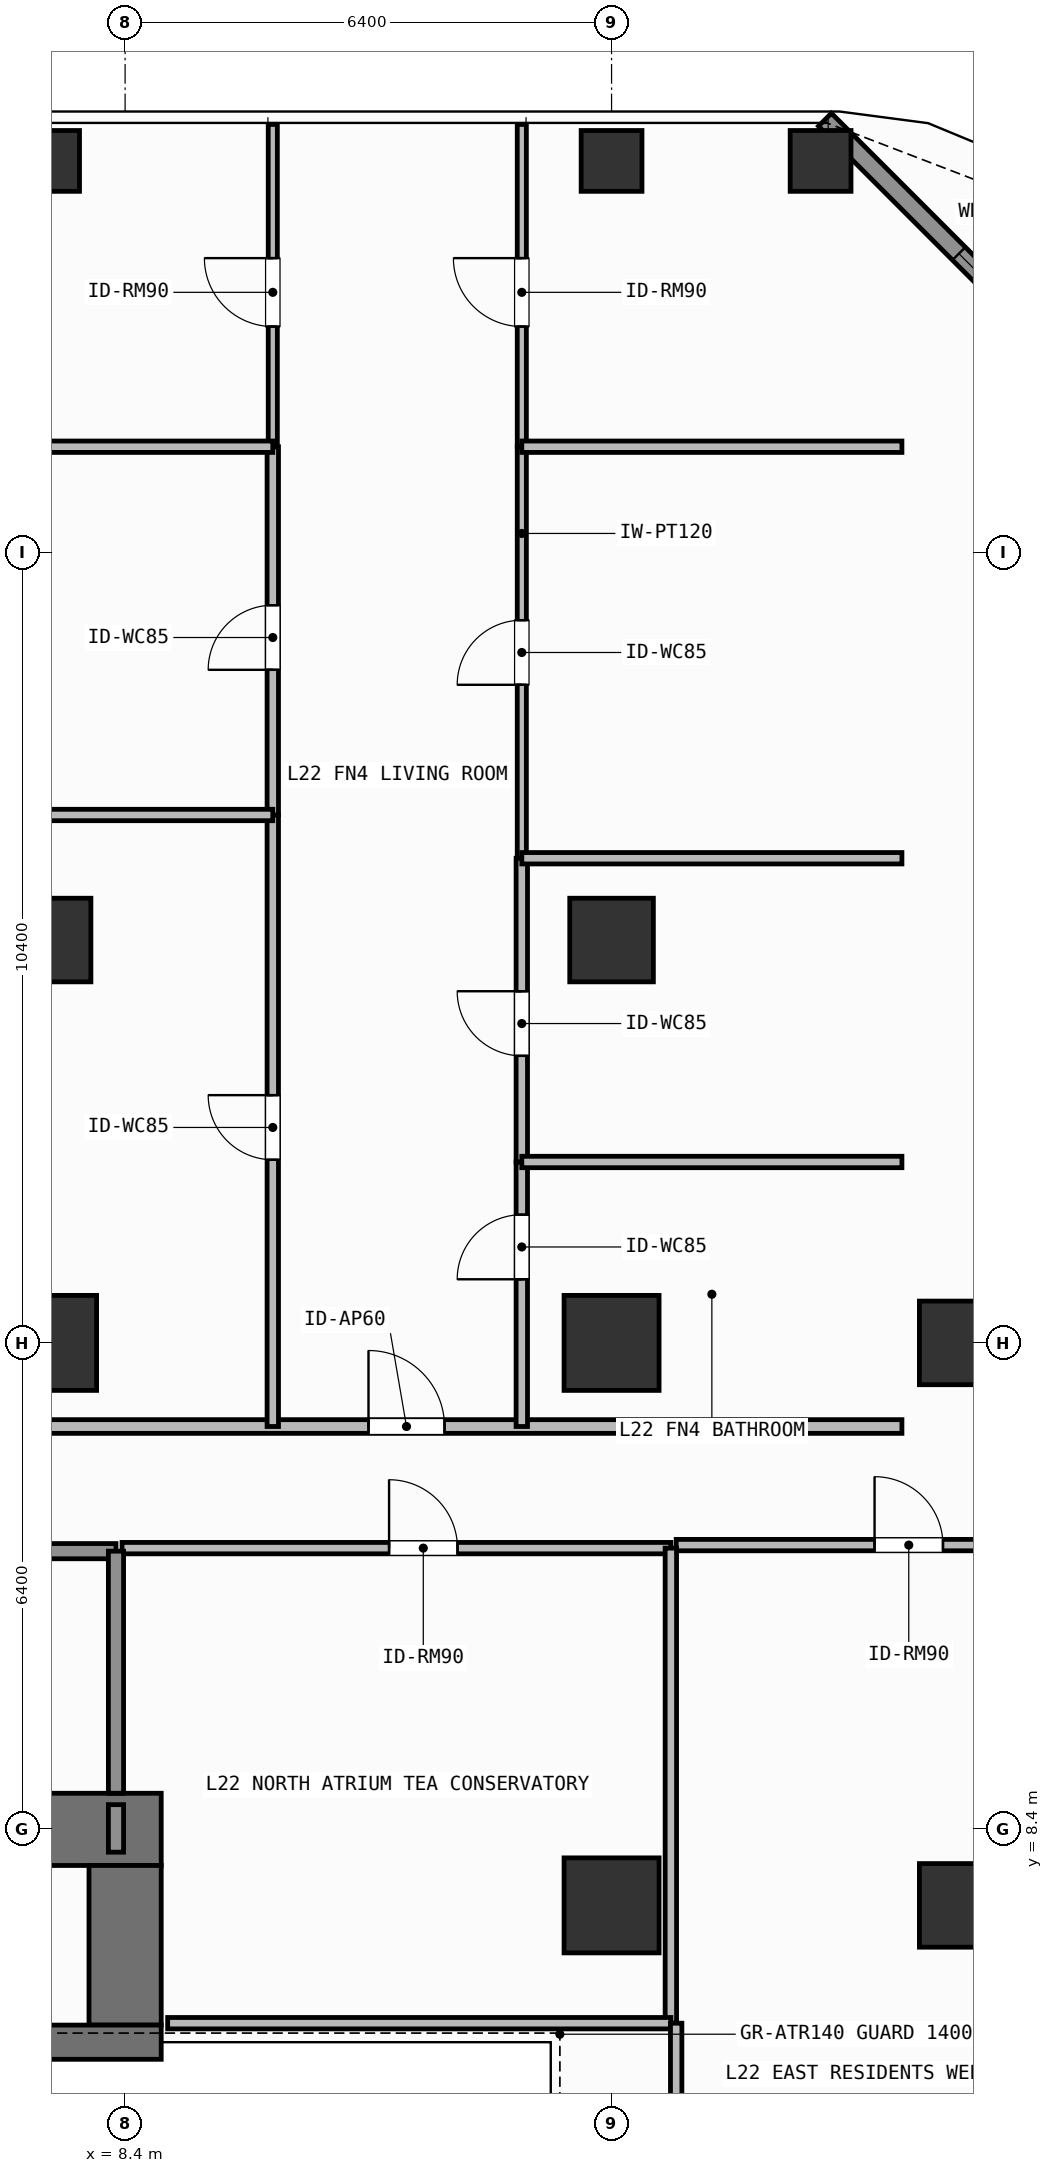
"""IFC4 building model, lengths in metres.
Left out: names, types, materials, properties, quantities, classifications, styles, units other than length and angle.
Written with IfcOpenShell. Run it as: python <this file> out.ifc"""

import sys

from ifc_helpers import new_model, si_unit, direction, frame, frame_2d, origin, origin_2d, place, context, subcontext, project, spatial, rectangle, hollow_rectangle, extrude, element, fill, save


model = new_model("IFC4")
c1 = context("Model", 3, precision=1e-05, world=origin(), true_north=direction((0.0, 1.0)))
c2 = subcontext(c1, "Body", "Model", "MODEL_VIEW")
j1 = project(units=[si_unit("LENGTHUNIT", "METRE"), si_unit("PLANEANGLEUNIT", "RADIAN")], contexts=[c1])
p1 = place(None, origin())
s1 = spatial("IfcSite", under=j1, at=p1, CompositionType="ELEMENT")
p2 = place(p1, origin())
s2 = spatial("IfcBuilding", under=s1, at=p2, CompositionType="ELEMENT")
p3 = place(p2, frame((0.0, 0.0, 89.1)))
s3 = spatial("IfcBuildingStorey", under=s2, at=p3, CompositionType="ELEMENT", Elevation=89.1)
p4 = place(p3, frame((-7.55, 8.4, 0.0), z_axis=(0.0, 0.0, 1.0), x_axis=(1.0, 0.0, 0.0)))
e1 = element("IfcWall", 1, at=p4, inside=s3, PredefinedType="SHEAR", context=c2, shape_type="SweptSolid", body=[
    extrude(rectangle(XDim=16.425, YDim=0.95, at=frame_2d((8.212, 0.0))), origin(), (0.0, 0.0, 1.0), 3.9),
])
p5 = place(p3, frame((8.4, 5.825, 0.0), z_axis=(0.0, 0.0, 1.0), x_axis=(0.0, 1.0, 0.0)))
e2 = element("IfcWall", 2, at=p5, inside=s3, PredefinedType="SHEAR", context=c2, shape_type="SweptSolid", body=[
    extrude(rectangle(XDim=2.1, YDim=0.95, at=frame_2d((1.05, 0.0))), origin(), (0.0, 0.0, 1.0), 3.9),
])
p6 = place(p3, frame((3.045, 5.6, 0.0), z_axis=(0.0, 0.0, 1.0), x_axis=(1.0, 0.0, 0.0)))
e3 = element("IfcWall", 3, at=p6, inside=s3, PredefinedType="SHEAR", context=c2, shape_type="SweptSolid", body=[
    extrude(rectangle(XDim=5.83, YDim=0.45, at=frame_2d((2.915, 0.0))), origin(), (0.0, 0.0, 1.0), 3.9),
])
for number, where, z_axis, x_axis in (
    (4, (7.4, 14.8, 0.0), (0.0, 0.0, 1.0), (1.0, 0.0, 0.0)),
    (5, (14.8, 14.8, 0.0), (0.0, 0.0, 1.0), (1.0, 0.0, 0.0)),
    (6, (14.8, 7.4, 0.0), (0.0, 0.0, 1.0), (1.0, 0.0, 0.0)),
):
    element("IfcColumn", number, at=place(p3, frame(where, z_axis=z_axis, x_axis=x_axis)), inside=s3, PredefinedType="COLUMN", context=c2, shape_type="SweptSolid", body=[
        extrude(rectangle(XDim=1.25, YDim=1.25, at=origin_2d()), origin(), (0.0, 0.0, 1.0), 3.9),
    ])
for number, where, z_axis, x_axis in (
    (7, (19.4, 7.4, 0.0), (0.0, 0.0, 1.0), (1.0, 0.0, 0.0)),
    (8, (19.4, 14.8, 0.0), (0.0, 0.0, 1.0), (1.0, 0.0, 0.0)),
    (9, (7.4, 20.1, 0.0), (0.0, 0.0, 1.0), (1.0, 0.0, 0.0)),
    (10, (14.8, 20.1, 0.0), (0.0, 0.0, 1.0), (1.0, 0.0, 0.0)),
):
    element("IfcColumn", number, at=place(p3, frame(where, z_axis=z_axis, x_axis=x_axis)), inside=s3, PredefinedType="COLUMN", context=c2, shape_type="SweptSolid", body=[
        extrude(rectangle(XDim=1.1, YDim=1.1, at=origin_2d()), origin(), (0.0, 0.0, 1.0), 3.9),
    ])
for number, where, z_axis, x_axis in (
    (11, (17.55, 30.35, 0.0), (0.0, 0.0, 1.0), (1.0, 0.0, 0.0)),
    (12, (7.4, 30.35, 0.0), (0.0, 0.0, 1.0), (1.0, 0.0, 0.0)),
    (13, (14.8, 30.35, 0.0), (0.0, 0.0, 1.0), (1.0, 0.0, 0.0)),
):
    element("IfcColumn", number, at=place(p3, frame(where, z_axis=z_axis, x_axis=x_axis)), inside=s3, PredefinedType="COLUMN", context=c2, shape_type="SweptSolid", body=[
        extrude(hollow_rectangle(XDim=0.8, YDim=0.8, WallThickness=0.036, at=origin_2d()), origin(), (0.0, 0.0, 1.0), 3.9),
    ])
p7 = place(p3, frame((17.608, 30.892, 0.0), z_axis=(0.0, 0.0, 1.0), x_axis=(0.707106781187, -0.707106781187, 0.0)))
e14 = element("IfcWall", 14, at=p7, inside=s3, PredefinedType="SOLIDWALL", context=c2, shape_type="SweptSolid", body=[
    extrude(rectangle(XDim=6.484, YDim=0.24, at=frame_2d((3.242, 0.0))), origin(), (0.0, 0.0, 1.0), 3.68),
])
p8 = place(p7, frame((2.492, 0.0, 0.8)))
e15 = element("IfcOpeningElement", 15, at=p8, cuts=e14, PredefinedType="OPENING", context=c2, shape_type="SweptSolid", body=[
    extrude(rectangle(XDim=1.5, YDim=1.85, at=frame_2d((0.75, 0.925))), frame((0.0, 0.13, 0.0), z_axis=(0.0, -1.0, 0.0), x_axis=(1.0, 0.0, 0.0)), (0.0, 0.0, 1.0), 0.26),
])
p9 = place(p3, frame((4.58, 12.06, 0.0), z_axis=(0.0, 0.0, 1.0), x_axis=(1.0, 0.0, 0.0)))
e16 = element("IfcWall", 16, at=p9, inside=s3, PredefinedType="SOLIDWALL", context=c2, shape_type="SweptSolid", body=[
    extrude(rectangle(XDim=3.7, YDim=0.2, at=frame_2d((1.85, 0.0))), origin(), (0.0, 0.0, 1.0), 3.68),
])
p10 = place(p9, frame((1.212, 0.0, 0.0)))
e17 = element("IfcOpeningElement", 17, at=p10, cuts=e16, PredefinedType="OPENING", context=c2, shape_type="SweptSolid", body=[
    extrude(rectangle(XDim=1.1, YDim=2.15, at=frame_2d((0.55, 1.075))), frame((0.0, 0.11, 0.0), z_axis=(0.0, -1.0, 0.0), x_axis=(1.0, 0.0, 0.0)), (0.0, 0.0, 1.0), 0.22),
])
p11 = place(p3, frame((8.36, 12.1, 0.0), z_axis=(0.0, 0.0, 1.0), x_axis=(1.0, 0.0, 0.0)))
e18 = element("IfcWall", 18, at=p11, inside=s3, PredefinedType="PARTITIONING", context=c2, shape_type="SweptSolid", body=[
    extrude(rectangle(XDim=7.22, YDim=0.15, at=frame_2d((3.61, 0.0))), origin(), (0.0, 0.0, 1.0), 3.68),
])
p12 = place(p11, frame((3.513, 0.0, 0.0)))
e19 = element("IfcOpeningElement", 19, at=p12, cuts=e18, PredefinedType="OPENING", context=c2, shape_type="SweptSolid", body=[
    extrude(rectangle(XDim=0.9, YDim=2.1, at=frame_2d((0.45, 1.05))), frame((0.0, 0.085, 0.0), z_axis=(0.0, -1.0, 0.0), x_axis=(1.0, 0.0, 0.0)), (0.0, 0.0, 1.0), 0.17),
])
p13 = place(p3, frame((6.117, 13.7, 0.0), z_axis=(0.0, 0.0, 1.0), x_axis=(1.0, 0.0, 0.0)))
e20 = element("IfcWall", 20, at=p13, inside=s3, PredefinedType="PARTITIONING", context=c2, shape_type="SweptSolid", body=[
    extrude(rectangle(XDim=12.503, YDim=0.18, at=frame_2d((6.251, 0.0))), origin(), (0.0, 0.0, 1.0), 3.68),
])
p14 = place(p13, frame((5.485, 0.0, 0.0)))
e21 = element("IfcOpeningElement", 21, at=p14, cuts=e20, PredefinedType="OPENING", context=c2, shape_type="SweptSolid", body=[
    extrude(rectangle(XDim=1.0, YDim=2.2, at=frame_2d((0.5, 1.1))), frame((0.0, 0.1, 0.0), z_axis=(0.0, -1.0, 0.0), x_axis=(1.0, 0.0, 0.0)), (0.0, 0.0, 1.0), 0.2),
])
p15 = place(p3, frame((10.343, 13.7, 0.0), z_axis=(0.0, 0.0, 1.0), x_axis=(0.0, 1.0, 0.0)))
e22 = element("IfcWall", 22, at=p15, inside=s3, PredefinedType="PARTITIONING", context=c2, shape_type="SweptSolid", body=[
    extrude(rectangle(XDim=8.045, YDim=0.15, at=frame_2d((4.022, 0.0))), origin(), (0.0, 0.0, 1.0), 3.68),
])
p16 = place(p15, frame((3.51, 0.0, 0.0)))
e23 = element("IfcOpeningElement", 23, at=p16, cuts=e22, PredefinedType="OPENING", context=c2, shape_type="SweptSolid", body=[
    extrude(rectangle(XDim=0.85, YDim=2.1, at=frame_2d((0.425, 1.05))), frame((0.0, 0.085, 0.0), z_axis=(0.0, -1.0, 0.0), x_axis=(1.0, 0.0, 0.0)), (0.0, 0.0, 1.0), 0.17),
])
p17 = place(p3, frame((10.343, 21.745, 0.0), z_axis=(0.0, 0.0, 1.0), x_axis=(0.0, 1.0, 0.0)))
e24 = element("IfcWall", 24, at=p17, inside=s3, PredefinedType="PARTITIONING", context=c2, shape_type="SweptSolid", body=[
    extrude(rectangle(XDim=4.845, YDim=0.15, at=frame_2d((2.422, 0.0))), origin(), (0.0, 0.0, 1.0), 3.68),
])
p18 = place(p17, frame((1.91, 0.0, 0.0)))
e25 = element("IfcOpeningElement", 25, at=p18, cuts=e24, PredefinedType="OPENING", context=c2, shape_type="SweptSolid", body=[
    extrude(rectangle(XDim=0.85, YDim=2.1, at=frame_2d((0.425, 1.05))), frame((0.0, 0.085, 0.0), z_axis=(0.0, -1.0, 0.0), x_axis=(1.0, 0.0, 0.0)), (0.0, 0.0, 1.0), 0.17),
])
p19 = place(p3, frame((10.343, 26.59, 0.0), z_axis=(0.0, 0.0, 1.0), x_axis=(0.0, 1.0, 0.0)))
e26 = element("IfcWall", 26, at=p19, inside=s3, PredefinedType="PARTITIONING", context=c2, shape_type="SweptSolid", body=[
    extrude(rectangle(XDim=4.24, YDim=0.12, at=frame_2d((2.12, 0.0))), origin(), (0.0, 0.0, 1.0), 3.68),
])
p20 = place(p19, frame((1.581, 0.0, 0.0)))
e27 = element("IfcOpeningElement", 27, at=p20, cuts=e26, PredefinedType="OPENING", context=c2, shape_type="SweptSolid", body=[
    extrude(rectangle(XDim=0.9, YDim=2.1, at=frame_2d((0.45, 1.05))), frame((0.0, 0.07, 0.0), z_axis=(0.0, -1.0, 0.0), x_axis=(1.0, 0.0, 0.0)), (0.0, 0.0, 1.0), 0.14),
])
p21 = place(p3, frame((13.619, 13.7, 0.0), z_axis=(0.0, 0.0, 1.0), x_axis=(0.0, 1.0, 0.0)))
e28 = element("IfcWall", 28, at=p21, inside=s3, PredefinedType="PARTITIONING", context=c2, shape_type="SweptSolid", body=[
    extrude(rectangle(XDim=3.48, YDim=0.15, at=frame_2d((1.74, 0.0))), origin(), (0.0, 0.0, 1.0), 3.68),
])
p22 = place(p21, frame((1.937, 0.0, 0.0)))
e29 = element("IfcOpeningElement", 29, at=p22, cuts=e28, PredefinedType="OPENING", context=c2, shape_type="SweptSolid", body=[
    extrude(rectangle(XDim=0.85, YDim=2.1, at=frame_2d((0.425, 1.05))), frame((0.0, 0.085, 0.0), z_axis=(0.0, -1.0, 0.0), x_axis=(1.0, 0.0, 0.0)), (0.0, 0.0, 1.0), 0.17),
])
p23 = place(p3, frame((13.619, 17.18, 0.0), z_axis=(0.0, 0.0, 1.0), x_axis=(0.0, 1.0, 0.0)))
e30 = element("IfcWall", 30, at=p23, inside=s3, PredefinedType="PARTITIONING", context=c2, shape_type="SweptSolid", body=[
    extrude(rectangle(XDim=3.996, YDim=0.15, at=frame_2d((1.998, 0.0))), origin(), (0.0, 0.0, 1.0), 3.68),
])
p24 = place(p23, frame((1.396, 0.0, 0.0)))
e31 = element("IfcOpeningElement", 31, at=p24, cuts=e30, PredefinedType="OPENING", context=c2, shape_type="SweptSolid", body=[
    extrude(rectangle(XDim=0.85, YDim=2.1, at=frame_2d((0.425, 1.05))), frame((0.0, 0.085, 0.0), z_axis=(0.0, -1.0, 0.0), x_axis=(1.0, 0.0, 0.0)), (0.0, 0.0, 1.0), 0.17),
])
p25 = place(p3, frame((13.619, 21.176, 0.0), z_axis=(0.0, 0.0, 1.0), x_axis=(0.0, 1.0, 0.0)))
e32 = element("IfcWall", 32, at=p25, inside=s3, PredefinedType="PARTITIONING", context=c2, shape_type="SweptSolid", body=[
    extrude(rectangle(XDim=5.414, YDim=0.12, at=frame_2d((2.707, 0.0))), origin(), (0.0, 0.0, 1.0), 3.68),
])
p26 = place(p25, frame((2.282, 0.0, 0.0)))
e33 = element("IfcOpeningElement", 33, at=p26, cuts=e32, PredefinedType="OPENING", context=c2, shape_type="SweptSolid", body=[
    extrude(rectangle(XDim=0.85, YDim=2.1, at=frame_2d((0.425, 1.05))), frame((0.0, 0.07, 0.0), z_axis=(0.0, -1.0, 0.0), x_axis=(1.0, 0.0, 0.0)), (0.0, 0.0, 1.0), 0.14),
])
p27 = place(p3, frame((13.619, 26.59, 0.0), z_axis=(0.0, 0.0, 1.0), x_axis=(0.0, 1.0, 0.0)))
e34 = element("IfcWall", 34, at=p27, inside=s3, PredefinedType="PARTITIONING", context=c2, shape_type="SweptSolid", body=[
    extrude(rectangle(XDim=4.24, YDim=0.12, at=frame_2d((2.12, 0.0))), origin(), (0.0, 0.0, 1.0), 3.68),
])
p28 = place(p27, frame((1.581, 0.0, 0.0)))
e35 = element("IfcOpeningElement", 35, at=p28, cuts=e34, PredefinedType="OPENING", context=c2, shape_type="SweptSolid", body=[
    extrude(rectangle(XDim=0.9, YDim=2.1, at=frame_2d((0.45, 1.05))), frame((0.0, 0.07, 0.0), z_axis=(0.0, -1.0, 0.0), x_axis=(1.0, 0.0, 0.0)), (0.0, 0.0, 1.0), 0.14),
])
p29 = place(p3, frame((15.65, 12.14, 0.0), z_axis=(0.0, 0.0, 1.0), x_axis=(1.0, 0.0, 0.0)))
e36 = element("IfcWall", 36, at=p29, inside=s3, PredefinedType="PARTITIONING", context=c2, shape_type="SweptSolid", body=[
    extrude(rectangle(XDim=6.47, YDim=0.15, at=frame_2d((3.235, 0.0))), origin(), (0.0, 0.0, 1.0), 3.68),
])
p30 = place(p29, frame((2.61, 0.0, 0.0)))
e37 = element("IfcOpeningElement", 37, at=p30, cuts=e36, PredefinedType="OPENING", context=c2, shape_type="SweptSolid", body=[
    extrude(rectangle(XDim=0.9, YDim=2.1, at=frame_2d((0.45, 1.05))), frame((0.0, 0.085, 0.0), z_axis=(0.0, -1.0, 0.0), x_axis=(1.0, 0.0, 0.0)), (0.0, 0.0, 1.0), 0.17),
])
p31 = place(p3, frame((8.28, 8.875, 0.0), z_axis=(0.0, 0.0, 1.0), x_axis=(0.0, 1.0, 0.0)))
e38 = element("IfcWall", 38, at=p31, inside=s3, PredefinedType="SOLIDWALL", context=c2, shape_type="SweptSolid", body=[
    extrude(rectangle(XDim=3.185, YDim=0.2, at=frame_2d((1.593, 0.0))), origin(), (0.0, 0.0, 1.0), 3.68),
])
p32 = place(p3, frame((8.28, 8.1, 0.0), z_axis=(0.0, 0.0, 1.0), x_axis=(0.0, 1.0, 0.0)))
e39 = element("IfcWall", 39, at=p32, inside=s3, PredefinedType="SOLIDWALL", context=c2, shape_type="SweptSolid", body=[
    extrude(rectangle(XDim=0.625, YDim=0.2, at=frame_2d((0.312, 0.0))), origin(), (0.0, 0.0, 1.0), 3.68),
])
p33 = place(p3, frame((15.58, 5.85, 0.0), z_axis=(0.0, 0.0, 1.0), x_axis=(0.0, 1.0, 0.0)))
e40 = element("IfcWall", 40, at=p33, inside=s3, PredefinedType="PARTITIONING", context=c2, shape_type="SweptSolid", body=[
    extrude(rectangle(XDim=6.25, YDim=0.15, at=frame_2d((3.125, 0.0))), origin(), (0.0, 0.0, 1.0), 3.68),
])
p34 = place(p3, frame((8.96, 5.85, 0.0), z_axis=(0.0, 0.0, 1.0), x_axis=(1.0, 0.0, 0.0)))
e41 = element("IfcWall", 41, at=p34, inside=s3, PredefinedType="PARTITIONING", context=c2, shape_type="SweptSolid", body=[
    extrude(rectangle(XDim=6.62, YDim=0.15, at=frame_2d((3.31, 0.0))), origin(), (0.0, 0.0, 1.0), 3.68),
])
for number, where, z_axis, x_axis in (
    (42, (6.117, 21.745, 0.0), (0.0, 0.0, 1.0), (1.0, 0.0, 0.0)),
    (43, (6.117, 26.59, 0.0), (0.0, 0.0, 1.0), (1.0, 0.0, 0.0)),
):
    element("IfcWall", number, at=place(p3, frame(where, z_axis=z_axis, x_axis=x_axis)), inside=s3, PredefinedType="PARTITIONING", context=c2, shape_type="SweptSolid", body=[
        extrude(rectangle(XDim=4.226, YDim=0.15, at=frame_2d((2.113, 0.0))), origin(), (0.0, 0.0, 1.0), 3.68),
    ])
for number, where, z_axis, x_axis in (
    (44, (13.619, 17.18, 0.0), (0.0, 0.0, 1.0), (1.0, 0.0, 0.0)),
    (45, (13.619, 21.176, 0.0), (0.0, 0.0, 1.0), (1.0, 0.0, 0.0)),
    (46, (13.619, 26.59, 0.0), (0.0, 0.0, 1.0), (1.0, 0.0, 0.0)),
):
    element("IfcWall", number, at=place(p3, frame(where, z_axis=z_axis, x_axis=x_axis)), inside=s3, PredefinedType="PARTITIONING", context=c2, shape_type="SweptSolid", body=[
        extrude(rectangle(XDim=5.001, YDim=0.15, at=frame_2d((2.5, 0.0))), origin(), (0.0, 0.0, 1.0), 3.68),
    ])
p35 = place(p3, frame((15.65, -1.8, 0.0), z_axis=(0.0, 0.0, 1.0), x_axis=(0.0, 1.0, 0.0)))
e47 = element("IfcWall", 47, at=p35, inside=s3, PredefinedType="PARTITIONING", context=c2, shape_type="SweptSolid", body=[
    extrude(rectangle(XDim=7.65, YDim=0.15, at=frame_2d((3.825, 0.0))), origin(), (0.0, 0.0, 1.0), 3.68),
])
p36 = place(p8, origin())
e48 = element("IfcWindow", 48, at=p36, inside=s3, PartitioningType="SINGLE_PANEL", PredefinedType="WINDOW", context=c2, shape_type="SweptSolid", body=[
    extrude(rectangle(XDim=1.5, YDim=1.85, at=frame_2d((0.75, 0.925))), frame((0.0, 0.03, 0.0), z_axis=(0.0, -1.0, 0.0), x_axis=(1.0, 0.0, 0.0)), (0.0, 0.0, 1.0), 0.06),
])
fill(e15, e48)
p37 = place(p12, origin())
e49 = element("IfcDoor", 49, at=p37, inside=s3, OperationType="SINGLE_SWING_LEFT", PredefinedType="DOOR", context=c2, shape_type="SweptSolid", body=[
    extrude(rectangle(XDim=0.9, YDim=2.1, at=frame_2d((0.45, 1.05))), frame((0.0, 0.025, 0.0), z_axis=(0.0, -1.0, 0.0), x_axis=(1.0, 0.0, 0.0)), (0.0, 0.0, 1.0), 0.05),
])
fill(e19, e49)
p38 = place(p14, origin())
e50 = element("IfcDoor", 50, at=p38, inside=s3, OperationType="SINGLE_SWING_LEFT", PredefinedType="DOOR", context=c2, shape_type="SweptSolid", body=[
    extrude(rectangle(XDim=1.0, YDim=2.2, at=frame_2d((0.5, 1.1))), frame((0.0, 0.025, 0.0), z_axis=(0.0, -1.0, 0.0), x_axis=(1.0, 0.0, 0.0)), (0.0, 0.0, 1.0), 0.05),
])
fill(e21, e50)
p39 = place(p16, origin())
e51 = element("IfcDoor", 51, at=p39, inside=s3, OperationType="SINGLE_SWING_RIGHT", PredefinedType="DOOR", context=c2, shape_type="SweptSolid", body=[
    extrude(rectangle(XDim=0.85, YDim=2.1, at=frame_2d((0.425, 1.05))), frame((0.0, 0.025, 0.0), z_axis=(0.0, -1.0, 0.0), x_axis=(1.0, 0.0, 0.0)), (0.0, 0.0, 1.0), 0.05),
])
fill(e23, e51)
p40 = place(p18, origin())
e52 = element("IfcDoor", 52, at=p40, inside=s3, OperationType="SINGLE_SWING_LEFT", PredefinedType="DOOR", context=c2, shape_type="SweptSolid", body=[
    extrude(rectangle(XDim=0.85, YDim=2.1, at=frame_2d((0.425, 1.05))), frame((0.0, 0.025, 0.0), z_axis=(0.0, -1.0, 0.0), x_axis=(1.0, 0.0, 0.0)), (0.0, 0.0, 1.0), 0.05),
])
fill(e25, e52)
p41 = place(p20, origin())
e53 = element("IfcDoor", 53, at=p41, inside=s3, OperationType="SINGLE_SWING_RIGHT", PredefinedType="DOOR", context=c2, shape_type="SweptSolid", body=[
    extrude(rectangle(XDim=0.9, YDim=2.1, at=frame_2d((0.45, 1.05))), frame((0.0, 0.025, 0.0), z_axis=(0.0, -1.0, 0.0), x_axis=(1.0, 0.0, 0.0)), (0.0, 0.0, 1.0), 0.05),
])
fill(e27, e53)
p42 = place(p22, origin())
e54 = element("IfcDoor", 54, at=p42, inside=s3, OperationType="SINGLE_SWING_LEFT", PredefinedType="DOOR", context=c2, shape_type="SweptSolid", body=[
    extrude(rectangle(XDim=0.85, YDim=2.1, at=frame_2d((0.425, 1.05))), frame((0.0, 0.025, 0.0), z_axis=(0.0, -1.0, 0.0), x_axis=(1.0, 0.0, 0.0)), (0.0, 0.0, 1.0), 0.05),
])
fill(e29, e54)
p43 = place(p24, origin())
e55 = element("IfcDoor", 55, at=p43, inside=s3, OperationType="SINGLE_SWING_RIGHT", PredefinedType="DOOR", context=c2, shape_type="SweptSolid", body=[
    extrude(rectangle(XDim=0.85, YDim=2.1, at=frame_2d((0.425, 1.05))), frame((0.0, 0.025, 0.0), z_axis=(0.0, -1.0, 0.0), x_axis=(1.0, 0.0, 0.0)), (0.0, 0.0, 1.0), 0.05),
])
fill(e31, e55)
p44 = place(p26, origin())
e56 = element("IfcDoor", 56, at=p44, inside=s3, OperationType="SINGLE_SWING_LEFT", PredefinedType="DOOR", context=c2, shape_type="SweptSolid", body=[
    extrude(rectangle(XDim=0.85, YDim=2.1, at=frame_2d((0.425, 1.05))), frame((0.0, 0.025, 0.0), z_axis=(0.0, -1.0, 0.0), x_axis=(1.0, 0.0, 0.0)), (0.0, 0.0, 1.0), 0.05),
])
fill(e33, e56)
p45 = place(p28, origin())
e57 = element("IfcDoor", 57, at=p45, inside=s3, OperationType="SINGLE_SWING_RIGHT", PredefinedType="DOOR", context=c2, shape_type="SweptSolid", body=[
    extrude(rectangle(XDim=0.9, YDim=2.1, at=frame_2d((0.45, 1.05))), frame((0.0, 0.025, 0.0), z_axis=(0.0, -1.0, 0.0), x_axis=(1.0, 0.0, 0.0)), (0.0, 0.0, 1.0), 0.05),
])
fill(e35, e57)
p46 = place(p30, origin())
e58 = element("IfcDoor", 58, at=p46, inside=s3, OperationType="SINGLE_SWING_LEFT", PredefinedType="DOOR", context=c2, shape_type="SweptSolid", body=[
    extrude(rectangle(XDim=0.9, YDim=2.1, at=frame_2d((0.45, 1.05))), frame((0.0, 0.025, 0.0), z_axis=(0.0, -1.0, 0.0), x_axis=(1.0, 0.0, 0.0)), (0.0, 0.0, 1.0), 0.05),
])
fill(e37, e58)
save(model, sys.argv[1])
